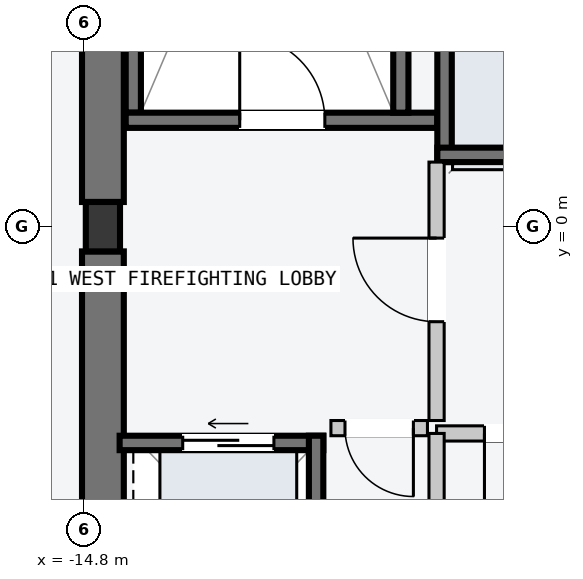
"""IFC4 building model, lengths in metres.
Left out: names, types, materials, properties, quantities, classifications, styles, units other than length and angle.
Written with IfcOpenShell. Run it as: python <this file> out.ifc"""

import sys

from ifc_helpers import new_model, si_unit, direction, frame, frame_2d, origin, origin_2d, place, context, subcontext, project, spatial, rectangle, i_section, extrude, element, fill, save


model = new_model("IFC4")
c1 = context("Model", 3, precision=1e-05, world=origin(), true_north=direction((0.0, 1.0)))
c2 = subcontext(c1, "Body", "Model", "MODEL_VIEW")
j1 = project(units=[si_unit("LENGTHUNIT", "METRE"), si_unit("PLANEANGLEUNIT", "RADIAN")], contexts=[c1])
p1 = place(None, origin())
s1 = spatial("IfcSite", under=j1, at=p1, CompositionType="ELEMENT")
p2 = place(p1, origin())
s2 = spatial("IfcBuilding", under=s1, at=p2, CompositionType="ELEMENT")
p3 = place(p2, frame((0.0, 0.0, 45.6)))
s3 = spatial("IfcBuildingStorey", under=s2, at=p3, CompositionType="ELEMENT", Elevation=45.6)
for number, where, z_axis, x_axis in (
    (1, (-14.55, -9.425, -0.2), (0.0, 0.0, 1.0), (0.0, 1.0, 0.0)),
    (2, (-14.55, 0.325, -0.2), (0.0, 0.0, 1.0), (0.0, 1.0, 0.0)),
):
    element("IfcWall", number, at=place(p3, frame(where, z_axis=z_axis, x_axis=x_axis)), inside=s3, PredefinedType="SHEAR", context=c2, shape_type="SweptSolid", body=[
        extrude(rectangle(XDim=9.1, YDim=0.55, at=frame_2d((4.55, 0.0))), origin(), (0.0, 0.0, 1.0), 3.6),
    ])
p4 = place(p3, frame((-14.15, 1.5, -0.2), z_axis=(0.0, 0.0, 1.0), x_axis=(0.0, 1.0, 0.0)))
e3 = element("IfcWall", 3, at=p4, inside=s3, PredefinedType="SOLIDWALL", context=c2, shape_type="SweptSolid", body=[
    extrude(rectangle(XDim=7.8, YDim=0.2, at=frame_2d((3.9, 0.0))), origin(), (0.0, 0.0, 1.0), 3.6),
])
p5 = place(p3, frame((-14.25, 1.4, -0.2), z_axis=(0.0, 0.0, 1.0), x_axis=(1.0, 0.0, 0.0)))
e4 = element("IfcWall", 4, at=p5, inside=s3, PredefinedType="SOLIDWALL", context=c2, shape_type="SweptSolid", body=[
    extrude(rectangle(XDim=4.1, YDim=0.2, at=frame_2d((2.05, 0.0))), origin(), (0.0, 0.0, 1.0), 3.6),
])
p6 = place(p5, frame((1.5, 0.0, 0.2)))
e5 = element("IfcOpeningElement", 5, at=p6, cuts=e4, PredefinedType="OPENING", context=c2, shape_type="SweptSolid", body=[
    extrude(rectangle(XDim=1.12, YDim=2.18, at=frame_2d((0.56, 1.09))), frame((0.0, 0.11, 0.0), z_axis=(0.0, -1.0, 0.0), x_axis=(1.0, 0.0, 0.0)), (0.0, 0.0, 1.0), 0.22),
])
p7 = place(p3, frame((-10.63, 1.5, -0.2), z_axis=(0.0, 0.0, 1.0), x_axis=(0.0, 1.0, 0.0)))
e6 = element("IfcWall", 6, at=p7, inside=s3, PredefinedType="SOLIDWALL", context=c2, shape_type="SweptSolid", body=[
    extrude(rectangle(XDim=7.8, YDim=0.2, at=frame_2d((3.9, 0.0))), origin(), (0.0, 0.0, 1.0), 3.6),
])
p8 = place(p3, frame((-14.55, 0.0, 0.0), z_axis=(0.0, 0.0, 1.0), x_axis=(1.0, 0.0, 0.0)))
e7 = element("IfcColumn", 7, at=p8, inside=s3, PredefinedType="COLUMN", context=c2, shape_type="SweptSolid", body=[
    extrude(i_section(OverallWidth=0.45, OverallDepth=0.65, WebThickness=0.025, FlangeThickness=0.04, at=origin_2d()), origin(), (0.0, 0.0, 1.0), 3.6),
])
p9 = place(p3, frame((-10.055, 0.85, -0.2), z_axis=(0.0, 0.0, 1.0), x_axis=(0.0, 1.0, 0.0)))
e8 = element("IfcWall", 8, at=p9, inside=s3, PredefinedType="SOLIDWALL", context=c2, shape_type="SweptSolid", body=[
    extrude(rectangle(XDim=1.9, YDim=0.19, at=frame_2d((0.95, 0.0))), origin(), (0.0, 0.0, 1.0), 3.6),
])
p10 = place(p3, frame((-10.15, 0.945, -0.2), z_axis=(0.0, 0.0, 1.0), x_axis=(1.0, 0.0, 0.0)))
e9 = element("IfcWall", 9, at=p10, inside=s3, PredefinedType="SOLIDWALL", context=c2, shape_type="SweptSolid", body=[
    extrude(rectangle(XDim=2.2, YDim=0.19, at=frame_2d((1.1, 0.0))), origin(), (0.0, 0.0, 1.0), 3.6),
])
p11 = place(p3, frame((-14.33, -2.845, -0.2), z_axis=(0.0, 0.0, 1.0), x_axis=(1.0, 0.0, 0.0)))
e10 = element("IfcWall", 10, at=p11, inside=s3, PredefinedType="SOLIDWALL", context=c2, shape_type="SweptSolid", body=[
    extrude(rectangle(XDim=2.68, YDim=0.19, at=frame_2d((1.34, 0.0))), origin(), (0.0, 0.0, 1.0), 3.6),
])
p12 = place(p11, frame((0.83, 0.0, 0.2)))
e11 = element("IfcOpeningElement", 11, at=p12, cuts=e10, PredefinedType="OPENING", context=c2, shape_type="SweptSolid", body=[
    extrude(rectangle(XDim=1.2, YDim=2.2, at=frame_2d((0.6, 1.1))), frame((0.0, 0.105, 0.0), z_axis=(0.0, -1.0, 0.0), x_axis=(1.0, 0.0, 0.0)), (0.0, 0.0, 1.0), 0.21),
])
p13 = place(p3, frame((-11.745, -5.35, -0.2), z_axis=(0.0, 0.0, 1.0), x_axis=(0.0, 1.0, 0.0)))
e12 = element("IfcWall", 12, at=p13, inside=s3, PredefinedType="SOLIDWALL", context=c2, shape_type="SweptSolid", body=[
    extrude(rectangle(XDim=2.6, YDim=0.19, at=frame_2d((1.3, 0.0))), origin(), (0.0, 0.0, 1.0), 3.6),
])
p14 = place(p3, frame((-10.16, -2.55, 0.0), z_axis=(0.0, 0.0, 1.0), x_axis=(0.0, 1.0, 0.0)))
e13 = element("IfcWall", 13, at=p14, inside=s3, PredefinedType="PARTITIONING", context=c2, shape_type="SweptSolid", body=[
    extrude(rectangle(XDim=3.4, YDim=0.2, at=frame_2d((1.7, 0.0))), origin(), (0.0, 0.0, 1.0), 3.4),
])
p15 = place(p14, frame((1.3, 0.0, 0.0)))
e14 = element("IfcOpeningElement", 14, at=p15, cuts=e13, PredefinedType="OPENING", context=c2, shape_type="SweptSolid", body=[
    extrude(rectangle(XDim=1.1, YDim=2.15, at=frame_2d((0.55, 1.075))), frame((0.0, 0.11, 0.0), z_axis=(0.0, -1.0, 0.0), x_axis=(1.0, 0.0, 0.0)), (0.0, 0.0, 1.0), 0.22),
])
p16 = place(p3, frame((-10.28, -2.65, 0.0), z_axis=(0.0, 0.0, 1.0), x_axis=(-1.0, 0.0, 0.0)))
e15 = element("IfcWall", 15, at=p16, inside=s3, PredefinedType="PARTITIONING", context=c2, shape_type="SweptSolid", body=[
    extrude(rectangle(XDim=1.27, YDim=0.2, at=frame_2d((0.635, 0.0))), origin(), (0.0, 0.0, 1.0), 3.4),
])
p17 = place(p16, frame((0.185, 0.0, 0.0)))
e16 = element("IfcOpeningElement", 16, at=p17, cuts=e15, PredefinedType="OPENING", context=c2, shape_type="SweptSolid", body=[
    extrude(rectangle(XDim=0.9, YDim=2.15, at=frame_2d((0.45, 1.075))), frame((0.0, 0.11, 0.0), z_axis=(0.0, -1.0, 0.0), x_axis=(1.0, 0.0, 0.0)), (0.0, 0.0, 1.0), 0.22),
])
p18 = place(p3, frame((-7.96, -2.72, 0.0), z_axis=(0.0, 0.0, 1.0), x_axis=(-1.0, 0.0, 0.0)))
e17 = element("IfcWall", 17, at=p18, inside=s3, PredefinedType="PARTITIONING", context=c2, shape_type="SweptSolid", body=[
    extrude(rectangle(XDim=2.2, YDim=0.2, at=frame_2d((1.1, 0.0))), origin(), (0.0, 0.0, 1.0), 3.4),
])
p19 = place(p18, frame((0.62, 0.0, 0.0)))
e18 = element("IfcOpeningElement", 18, at=p19, cuts=e17, PredefinedType="OPENING", context=c2, shape_type="SweptSolid", body=[
    extrude(rectangle(XDim=0.95, YDim=2.1, at=frame_2d((0.475, 1.05))), frame((0.0, 0.11, 0.0), z_axis=(0.0, -1.0, 0.0), x_axis=(1.0, 0.0, 0.0)), (0.0, 0.0, 1.0), 0.22),
])
p20 = place(p3, frame((-10.16, -5.16, 0.0), z_axis=(0.0, 0.0, 1.0), x_axis=(0.0, 1.0, 0.0)))
e19 = element("IfcWall", 19, at=p20, inside=s3, PredefinedType="PARTITIONING", context=c2, shape_type="SweptSolid", body=[
    extrude(rectangle(XDim=2.44, YDim=0.2, at=frame_2d((1.22, 0.0))), origin(), (0.0, 0.0, 1.0), 3.4),
])
p21 = place(p6, origin())
e20 = element("IfcDoor", 20, at=p21, inside=s3, OperationType="SINGLE_SWING_LEFT", PredefinedType="DOOR", context=c2, shape_type="SweptSolid", body=[
    extrude(rectangle(XDim=1.12, YDim=2.18, at=frame_2d((0.56, 1.09))), frame((0.0, 0.025, 0.0), z_axis=(0.0, -1.0, 0.0), x_axis=(1.0, 0.0, 0.0)), (0.0, 0.0, 1.0), 0.05),
])
fill(e5, e20)
p22 = place(p12, origin())
e21 = element("IfcDoor", 21, at=p22, inside=s3, OperationType="SLIDING_TO_LEFT", PredefinedType="DOOR", context=c2, shape_type="SweptSolid", body=[
    extrude(rectangle(XDim=1.2, YDim=2.2, at=frame_2d((0.6, 1.1))), frame((0.0, 0.025, 0.0), z_axis=(0.0, -1.0, 0.0), x_axis=(1.0, 0.0, 0.0)), (0.0, 0.0, 1.0), 0.05),
])
fill(e11, e21)
p23 = place(p15, origin())
e22 = element("IfcDoor", 22, at=p23, inside=s3, OperationType="SINGLE_SWING_RIGHT", PredefinedType="DOOR", context=c2, shape_type="SweptSolid", body=[
    extrude(rectangle(XDim=1.1, YDim=2.15, at=frame_2d((0.55, 1.075))), frame((0.0, 0.025, 0.0), z_axis=(0.0, -1.0, 0.0), x_axis=(1.0, 0.0, 0.0)), (0.0, 0.0, 1.0), 0.05),
])
fill(e14, e22)
p24 = place(p17, origin())
e23 = element("IfcDoor", 23, at=p24, inside=s3, OperationType="SINGLE_SWING_LEFT", PredefinedType="DOOR", context=c2, shape_type="SweptSolid", body=[
    extrude(rectangle(XDim=0.9, YDim=2.15, at=frame_2d((0.45, 1.075))), frame((0.0, 0.025, 0.0), z_axis=(0.0, -1.0, 0.0), x_axis=(1.0, 0.0, 0.0)), (0.0, 0.0, 1.0), 0.05),
])
fill(e16, e23)
p25 = place(p19, origin())
e24 = element("IfcDoor", 24, at=p25, inside=s3, OperationType="SINGLE_SWING_RIGHT", PredefinedType="DOOR", context=c2, shape_type="SweptSolid", body=[
    extrude(rectangle(XDim=0.95, YDim=2.1, at=frame_2d((0.475, 1.05))), frame((0.0, 0.025, 0.0), z_axis=(0.0, -1.0, 0.0), x_axis=(1.0, 0.0, 0.0)), (0.0, 0.0, 1.0), 0.05),
])
fill(e18, e24)
save(model, sys.argv[1])
